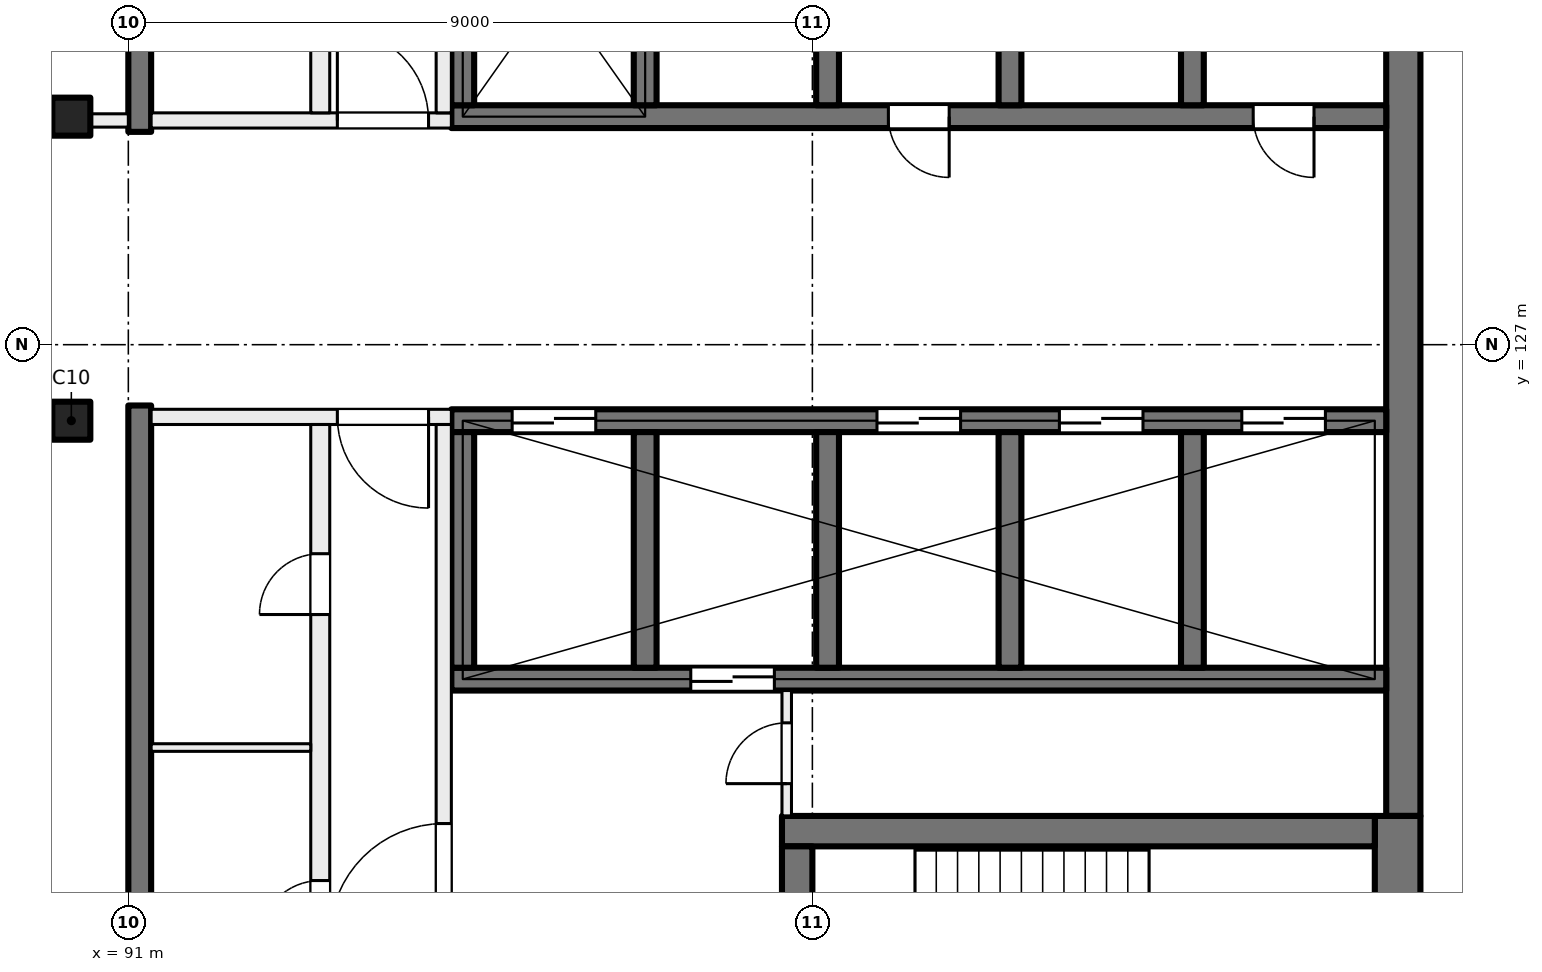
"""IFC4 building model, lengths in metres.
Left out: names, types, materials, properties, quantities, classifications, styles, units other than length and angle.
Written with IfcOpenShell. Run it as: python <this file> out.ifc"""

import sys

from ifc_helpers import new_model, si_unit, direction, frame, frame_2d, origin, origin_2d, place, context, subcontext, project, spatial, rectangle, extrude, element, fill, save


model = new_model("IFC4")
c1 = context("Model", 3, precision=1e-05, world=origin(), true_north=direction((0.0, 1.0)))
c2 = subcontext(c1, "Body", "Model", "MODEL_VIEW")
j1 = project(units=[si_unit("LENGTHUNIT", "METRE"), si_unit("PLANEANGLEUNIT", "RADIAN")], contexts=[c1])
p1 = place(None, origin())
s1 = spatial("IfcSite", under=j1, at=p1, CompositionType="ELEMENT")
p2 = place(p1, origin())
s2 = spatial("IfcBuilding", under=s1, at=p2, CompositionType="ELEMENT")
p3 = place(p2, frame((0.0, 0.0, 257.5)))
s3 = spatial("IfcBuildingStorey", under=s2, at=p3, CompositionType="ELEMENT", Elevation=257.5)
for number, where, z_axis, x_axis in (
    (1, (90.25, 130.0, 0.0), (0.0, 0.0, 1.0), (1.0, 0.0, 0.0)),
    (2, (90.25, 126.0, 0.0), (0.0, 0.0, 1.0), (1.0, 0.0, 0.0)),
):
    element("IfcColumn", number, at=place(p3, frame(where, z_axis=z_axis, x_axis=x_axis)), inside=s3, PredefinedType="COLUMN", context=c2, shape_type="SweptSolid", body=[
        extrude(rectangle(XDim=0.5, YDim=0.5, at=origin_2d()), origin(), (0.0, 0.0, 1.0), 4.0),
    ])
p4 = place(p3, frame((107.775, 135.2, 0.0), z_axis=(0.0, 0.0, 1.0), x_axis=(0.0, -1.0, 0.0)))
e3 = element("IfcWall", 3, at=p4, inside=s3, PredefinedType="SHEAR", context=c2, shape_type="SweptSolid", body=[
    extrude(rectangle(XDim=14.4, YDim=0.45, at=frame_2d((7.2, 0.0))), origin(), (0.0, 0.0, 1.0), 4.0),
])
p5 = place(p3, frame((107.7, 120.8, 0.0), z_axis=(0.0, 0.0, 1.0), x_axis=(0.0, -1.0, 0.0)))
e4 = element("IfcWall", 4, at=p5, inside=s3, PredefinedType="SHEAR", context=c2, shape_type="SweptSolid", body=[
    extrude(rectangle(XDim=3.8, YDim=0.6, at=frame_2d((1.9, 0.0))), origin(), (0.0, 0.0, 1.0), 4.0),
])
p6 = place(p3, frame((107.4, 120.6, 0.0), z_axis=(0.0, 0.0, 1.0), x_axis=(-1.0, 0.0, 0.0)))
e5 = element("IfcWall", 5, at=p6, inside=s3, PredefinedType="SHEAR", context=c2, shape_type="SweptSolid", body=[
    extrude(rectangle(XDim=7.8, YDim=0.4, at=frame_2d((3.9, 0.0))), origin(), (0.0, 0.0, 1.0), 4.0),
])
p7 = place(p3, frame((99.8, 120.4, 0.0), z_axis=(0.0, 0.0, 1.0), x_axis=(0.0, -1.0, 0.0)))
e6 = element("IfcWall", 6, at=p7, inside=s3, PredefinedType="SHEAR", context=c2, shape_type="SweptSolid", body=[
    extrude(rectangle(XDim=2.8, YDim=0.4, at=frame_2d((1.4, 0.0))), origin(), (0.0, 0.0, 1.0), 4.0),
])
p8 = place(p7, frame((0.975, 0.0, 0.0)))
e7 = element("IfcOpeningElement", 7, at=p8, cuts=e6, PredefinedType="OPENING", context=c2, shape_type="SweptSolid", body=[
    extrude(rectangle(XDim=1.0, YDim=2.1, at=frame_2d((0.5, 1.05))), frame((0.0, 0.21, 0.0), z_axis=(0.0, -1.0, 0.0), x_axis=(1.0, 0.0, 0.0)), (0.0, 0.0, 1.0), 0.42),
])
p9 = place(p3, frame((107.55, 130.0, 0.0), z_axis=(0.0, 0.0, 1.0), x_axis=(-1.0, 0.0, 0.0)))
e8 = element("IfcWall", 8, at=p9, inside=s3, PredefinedType="SHEAR", context=c2, shape_type="SweptSolid", body=[
    extrude(rectangle(XDim=12.3, YDim=0.3, at=frame_2d((6.15, 0.0))), origin(), (0.0, 0.0, 1.0), 4.0),
])
p10 = place(p9, frame((0.95, 0.0, 0.0)))
e9 = element("IfcOpeningElement", 9, at=p10, cuts=e8, PredefinedType="OPENING", context=c2, shape_type="SweptSolid", body=[
    extrude(rectangle(XDim=0.8, YDim=2.1, at=frame_2d((0.4, 1.05))), frame((0.0, 0.16, 0.0), z_axis=(0.0, -1.0, 0.0), x_axis=(1.0, 0.0, 0.0)), (0.0, 0.0, 1.0), 0.32),
])
p11 = place(p9, frame((5.75, 0.0, 0.0)))
e10 = element("IfcOpeningElement", 10, at=p11, cuts=e8, PredefinedType="OPENING", context=c2, shape_type="SweptSolid", body=[
    extrude(rectangle(XDim=0.8, YDim=2.1, at=frame_2d((0.4, 1.05))), frame((0.0, 0.16, 0.0), z_axis=(0.0, -1.0, 0.0), x_axis=(1.0, 0.0, 0.0)), (0.0, 0.0, 1.0), 0.32),
])
for number, where, z_axis, x_axis in (
    (11, (105.0, 133.25, 0.0), (0.0, 0.0, 1.0), (0.0, -1.0, 0.0)),
    (12, (102.6, 133.25, 0.0), (0.0, 0.0, 1.0), (0.0, -1.0, 0.0)),
    (13, (100.2, 133.25, 0.0), (0.0, 0.0, 1.0), (0.0, -1.0, 0.0)),
    (14, (97.8, 133.25, 0.0), (0.0, 0.0, 1.0), (0.0, -1.0, 0.0)),
    (15, (95.4, 133.25, 0.0), (0.0, 0.0, 1.0), (0.0, -1.0, 0.0)),
):
    element("IfcWall", number, at=place(p3, frame(where, z_axis=z_axis, x_axis=x_axis)), inside=s3, PredefinedType="SHEAR", context=c2, shape_type="SweptSolid", body=[
        extrude(rectangle(XDim=3.1, YDim=0.3, at=frame_2d((1.55, 0.0))), origin(), (0.0, 0.0, 1.0), 4.0),
    ])
p12 = place(p3, frame((107.55, 126.0, 0.0), z_axis=(0.0, 0.0, 1.0), x_axis=(-1.0, 0.0, 0.0)))
e16 = element("IfcWall", 16, at=p12, inside=s3, PredefinedType="SHEAR", context=c2, shape_type="SweptSolid", body=[
    extrude(rectangle(XDim=12.3, YDim=0.3, at=frame_2d((6.15, 0.0))), origin(), (0.0, 0.0, 1.0), 4.0),
])
p13 = place(p12, frame((0.8, 0.0, 0.0)))
e17 = element("IfcOpeningElement", 17, at=p13, cuts=e16, PredefinedType="OPENING", context=c2, shape_type="SweptSolid", body=[
    extrude(rectangle(XDim=1.1, YDim=2.1, at=frame_2d((0.55, 1.05))), frame((0.0, 0.16, 0.0), z_axis=(0.0, -1.0, 0.0), x_axis=(1.0, 0.0, 0.0)), (0.0, 0.0, 1.0), 0.32),
])
p14 = place(p12, frame((3.2, 0.0, 0.0)))
e18 = element("IfcOpeningElement", 18, at=p14, cuts=e16, PredefinedType="OPENING", context=c2, shape_type="SweptSolid", body=[
    extrude(rectangle(XDim=1.1, YDim=2.1, at=frame_2d((0.55, 1.05))), frame((0.0, 0.16, 0.0), z_axis=(0.0, -1.0, 0.0), x_axis=(1.0, 0.0, 0.0)), (0.0, 0.0, 1.0), 0.32),
])
p15 = place(p12, frame((5.6, 0.0, 0.0)))
e19 = element("IfcOpeningElement", 19, at=p15, cuts=e16, PredefinedType="OPENING", context=c2, shape_type="SweptSolid", body=[
    extrude(rectangle(XDim=1.1, YDim=2.1, at=frame_2d((0.55, 1.05))), frame((0.0, 0.16, 0.0), z_axis=(0.0, -1.0, 0.0), x_axis=(1.0, 0.0, 0.0)), (0.0, 0.0, 1.0), 0.32),
])
p16 = place(p12, frame((10.4, 0.0, 0.0)))
e20 = element("IfcOpeningElement", 20, at=p16, cuts=e16, PredefinedType="OPENING", context=c2, shape_type="SweptSolid", body=[
    extrude(rectangle(XDim=1.1, YDim=2.1, at=frame_2d((0.55, 1.05))), frame((0.0, 0.16, 0.0), z_axis=(0.0, -1.0, 0.0), x_axis=(1.0, 0.0, 0.0)), (0.0, 0.0, 1.0), 0.32),
])
p17 = place(p3, frame((107.55, 122.6, 0.0), z_axis=(0.0, 0.0, 1.0), x_axis=(-1.0, 0.0, 0.0)))
e21 = element("IfcWall", 21, at=p17, inside=s3, PredefinedType="SHEAR", context=c2, shape_type="SweptSolid", body=[
    extrude(rectangle(XDim=12.3, YDim=0.3, at=frame_2d((6.15, 0.0))), origin(), (0.0, 0.0, 1.0), 4.0),
])
p18 = place(p17, frame((8.05, 0.0, 0.0)))
e22 = element("IfcOpeningElement", 22, at=p18, cuts=e21, PredefinedType="OPENING", context=c2, shape_type="SweptSolid", body=[
    extrude(rectangle(XDim=1.1, YDim=2.1, at=frame_2d((0.55, 1.05))), frame((0.0, 0.16, 0.0), z_axis=(0.0, -1.0, 0.0), x_axis=(1.0, 0.0, 0.0)), (0.0, 0.0, 1.0), 0.32),
])
for number, where, z_axis, x_axis in (
    (23, (105.0, 125.85, 0.0), (0.0, 0.0, 1.0), (0.0, -1.0, 0.0)),
    (24, (102.6, 125.85, 0.0), (0.0, 0.0, 1.0), (0.0, -1.0, 0.0)),
    (25, (100.2, 125.85, 0.0), (0.0, 0.0, 1.0), (0.0, -1.0, 0.0)),
    (26, (97.8, 125.85, 0.0), (0.0, 0.0, 1.0), (0.0, -1.0, 0.0)),
    (27, (95.4, 125.85, 0.0), (0.0, 0.0, 1.0), (0.0, -1.0, 0.0)),
):
    element("IfcWall", number, at=place(p3, frame(where, z_axis=z_axis, x_axis=x_axis)), inside=s3, PredefinedType="SHEAR", context=c2, shape_type="SweptSolid", body=[
        extrude(rectangle(XDim=3.1, YDim=0.3, at=frame_2d((1.55, 0.0))), origin(), (0.0, 0.0, 1.0), 4.0),
    ])
for number, where, z_axis, x_axis in (
    (28, (91.15, 138.55, 0.0), (0.0, 0.0, 1.0), (0.0, -1.0, 0.0)),
    (29, (91.15, 126.2, 0.0), (0.0, 0.0, 1.0), (0.0, -1.0, 0.0)),
):
    element("IfcWall", number, at=place(p3, frame(where, z_axis=z_axis, x_axis=x_axis)), inside=s3, PredefinedType="SHEAR", context=c2, shape_type="SweptSolid", body=[
        extrude(rectangle(XDim=8.75, YDim=0.3, at=frame_2d((4.375, 0.0))), origin(), (0.0, 0.0, 1.0), 4.0),
    ])
p19 = place(p3, frame((95.25, 126.05, 0.0), z_axis=(0.0, 0.0, 1.0), x_axis=(-1.0, 0.0, 0.0)))
e30 = element("IfcWall", 30, at=p19, inside=s3, PredefinedType="PARTITIONING", context=c2, shape_type="SweptSolid", body=[
    extrude(rectangle(XDim=3.95, YDim=0.2, at=frame_2d((1.975, 0.0))), origin(), (0.0, 0.0, 1.0), 3.625),
])
p20 = place(p19, frame((0.3, 0.0, 0.0)))
e31 = element("IfcOpeningElement", 31, at=p20, cuts=e30, PredefinedType="OPENING", context=c2, shape_type="SweptSolid", body=[
    extrude(rectangle(XDim=1.2, YDim=2.1, at=frame_2d((0.6, 1.05))), frame((0.0, 0.11, 0.0), z_axis=(0.0, -1.0, 0.0), x_axis=(1.0, 0.0, 0.0)), (0.0, 0.0, 1.0), 0.22),
])
p21 = place(p3, frame((95.15, 117.45, 0.0), z_axis=(0.0, 0.0, 1.0), x_axis=(0.0, 1.0, 0.0)))
e32 = element("IfcWall", 32, at=p21, inside=s3, PredefinedType="PARTITIONING", context=c2, shape_type="SweptSolid", body=[
    extrude(rectangle(XDim=8.5, YDim=0.2, at=frame_2d((4.25, 0.0))), origin(), (0.0, 0.0, 1.0), 3.625),
])
p22 = place(p21, frame((1.75, 0.0, 0.0)))
e33 = element("IfcOpeningElement", 33, at=p22, cuts=e32, PredefinedType="OPENING", context=c2, shape_type="SweptSolid", body=[
    extrude(rectangle(XDim=1.5, YDim=2.1, at=frame_2d((0.75, 1.05))), frame((0.0, 0.11, 0.0), z_axis=(0.0, -1.0, 0.0), x_axis=(1.0, 0.0, 0.0)), (0.0, 0.0, 1.0), 0.22),
])
p23 = place(p3, frame((93.525, 117.45, 0.0), z_axis=(0.0, 0.0, 1.0), x_axis=(0.0, 1.0, 0.0)))
e34 = element("IfcWall", 34, at=p23, inside=s3, PredefinedType="PARTITIONING", context=c2, shape_type="SweptSolid", body=[
    extrude(rectangle(XDim=8.5, YDim=0.25, at=frame_2d((4.25, 0.0))), origin(), (0.0, 0.0, 1.0), 3.625),
])
p24 = place(p23, frame((6.0, 0.0, 0.0)))
e35 = element("IfcOpeningElement", 35, at=p24, cuts=e34, PredefinedType="OPENING", context=c2, shape_type="SweptSolid", body=[
    extrude(rectangle(XDim=0.8, YDim=2.1, at=frame_2d((0.4, 1.05))), frame((0.0, 0.135, 0.0), z_axis=(0.0, -1.0, 0.0), x_axis=(1.0, 0.0, 0.0)), (0.0, 0.0, 1.0), 0.27),
])
p25 = place(p23, frame((1.7, 0.0, 0.0)))
e36 = element("IfcOpeningElement", 36, at=p25, cuts=e34, PredefinedType="OPENING", context=c2, shape_type="SweptSolid", body=[
    extrude(rectangle(XDim=0.8, YDim=2.1, at=frame_2d((0.4, 1.05))), frame((0.0, 0.135, 0.0), z_axis=(0.0, -1.0, 0.0), x_axis=(1.0, 0.0, 0.0)), (0.0, 0.0, 1.0), 0.27),
])
p26 = place(p3, frame((99.663, 120.8, 0.0), z_axis=(0.0, 0.0, 1.0), x_axis=(0.0, 1.0, 0.0)))
e37 = element("IfcWall", 37, at=p26, inside=s3, PredefinedType="PARTITIONING", context=c2, shape_type="SweptSolid", body=[
    extrude(rectangle(XDim=1.65, YDim=0.125, at=frame_2d((0.825, 0.0))), origin(), (0.0, 0.0, 1.0), 3.625),
])
p27 = place(p26, frame((0.425, 0.0, 0.0)))
e38 = element("IfcOpeningElement", 38, at=p27, cuts=e37, PredefinedType="OPENING", context=c2, shape_type="SweptSolid", body=[
    extrude(rectangle(XDim=0.8, YDim=2.1, at=frame_2d((0.4, 1.05))), frame((0.0, 0.073, 0.0), z_axis=(0.0, -1.0, 0.0), x_axis=(1.0, 0.0, 0.0)), (0.0, 0.0, 1.0), 0.145),
])
p28 = place(p3, frame((93.4, 121.7, 0.0), z_axis=(0.0, 0.0, 1.0), x_axis=(-1.0, 0.0, 0.0)))
e39 = element("IfcWall", 39, at=p28, inside=s3, PredefinedType="PARTITIONING", context=c2, shape_type="SweptSolid", body=[
    extrude(rectangle(XDim=2.1, YDim=0.1, at=frame_2d((1.05, 0.0))), origin(), (0.0, 0.0, 1.0), 3.625),
])
p29 = place(p3, frame((91.3, 129.95, 0.0), z_axis=(0.0, 0.0, 1.0), x_axis=(1.0, 0.0, 0.0)))
e40 = element("IfcWall", 40, at=p29, inside=s3, PredefinedType="PARTITIONING", context=c2, shape_type="SweptSolid", body=[
    extrude(rectangle(XDim=3.95, YDim=0.2, at=frame_2d((1.975, 0.0))), origin(), (0.0, 0.0, 1.0), 3.625),
])
p30 = place(p29, frame((2.45, 0.0, 0.0)))
e41 = element("IfcOpeningElement", 41, at=p30, cuts=e40, PredefinedType="OPENING", context=c2, shape_type="SweptSolid", body=[
    extrude(rectangle(XDim=1.2, YDim=2.1, at=frame_2d((0.6, 1.05))), frame((0.0, 0.11, 0.0), z_axis=(0.0, -1.0, 0.0), x_axis=(1.0, 0.0, 0.0)), (0.0, 0.0, 1.0), 0.22),
])
p31 = place(p3, frame((95.15, 130.05, 0.0), z_axis=(0.0, 0.0, 1.0), x_axis=(0.0, 1.0, 0.0)))
e42 = element("IfcWall", 42, at=p31, inside=s3, PredefinedType="PARTITIONING", context=c2, shape_type="SweptSolid", body=[
    extrude(rectangle(XDim=8.5, YDim=0.2, at=frame_2d((4.25, 0.0))), origin(), (0.0, 0.0, 1.0), 3.625),
])
p32 = place(p31, frame((5.25, 0.0, 0.0)))
e43 = element("IfcOpeningElement", 43, at=p32, cuts=e42, PredefinedType="OPENING", context=c2, shape_type="SweptSolid", body=[
    extrude(rectangle(XDim=1.5, YDim=2.1, at=frame_2d((0.75, 1.05))), frame((0.0, 0.11, 0.0), z_axis=(0.0, -1.0, 0.0), x_axis=(1.0, 0.0, 0.0)), (0.0, 0.0, 1.0), 0.22),
])
p33 = place(p3, frame((93.525, 130.05, 0.0), z_axis=(0.0, 0.0, 1.0), x_axis=(0.0, 1.0, 0.0)))
e44 = element("IfcWall", 44, at=p33, inside=s3, PredefinedType="PARTITIONING", context=c2, shape_type="SweptSolid", body=[
    extrude(rectangle(XDim=8.5, YDim=0.25, at=frame_2d((4.25, 0.0))), origin(), (0.0, 0.0, 1.0), 3.625),
])
p34 = place(p33, frame((3.85, 0.0, 0.0)))
e45 = element("IfcOpeningElement", 45, at=p34, cuts=e44, PredefinedType="OPENING", context=c2, shape_type="SweptSolid", body=[
    extrude(rectangle(XDim=0.8, YDim=2.1, at=frame_2d((0.4, 1.05))), frame((0.0, 0.135, 0.0), z_axis=(0.0, -1.0, 0.0), x_axis=(1.0, 0.0, 0.0)), (0.0, 0.0, 1.0), 0.27),
])
p35 = place(p3, frame((85.838, 129.95, 0.0), z_axis=(0.0, 0.0, 1.0), x_axis=(1.0, 0.0, 0.0)))
e46 = element("IfcWall", 46, at=p35, inside=s3, PredefinedType="PARTITIONING", context=c2, shape_type="SweptSolid", body=[
    extrude(rectangle(XDim=5.162, YDim=0.175, at=frame_2d((2.581, 0.0))), origin(), (0.0, 0.0, 1.0), 3.625),
])
p36 = place(p35, frame((1.971, 0.0, 0.0)))
e47 = element("IfcOpeningElement", 47, at=p36, cuts=e46, PredefinedType="OPENING", context=c2, shape_type="SweptSolid", body=[
    extrude(rectangle(XDim=1.2, YDim=2.1, at=frame_2d((0.6, 1.05))), frame((0.0, 0.097, 0.0), z_axis=(0.0, -1.0, 0.0), x_axis=(1.0, 0.0, 0.0)), (0.0, 0.0, 1.0), 0.195),
])
p37 = place(p13, origin())
e48 = element("IfcDoor", 48, at=p37, inside=s3, OperationType="DOUBLE_DOOR_SLIDING", PredefinedType="DOOR", context=c2, shape_type="SweptSolid", body=[
    extrude(rectangle(XDim=1.1, YDim=2.1, at=frame_2d((0.55, 1.05))), frame((0.0, 0.025, 0.0), z_axis=(0.0, -1.0, 0.0), x_axis=(1.0, 0.0, 0.0)), (0.0, 0.0, 1.0), 0.05),
])
fill(e17, e48)
p38 = place(p14, origin())
e49 = element("IfcDoor", 49, at=p38, inside=s3, OperationType="DOUBLE_DOOR_SLIDING", PredefinedType="DOOR", context=c2, shape_type="SweptSolid", body=[
    extrude(rectangle(XDim=1.1, YDim=2.1, at=frame_2d((0.55, 1.05))), frame((0.0, 0.025, 0.0), z_axis=(0.0, -1.0, 0.0), x_axis=(1.0, 0.0, 0.0)), (0.0, 0.0, 1.0), 0.05),
])
fill(e18, e49)
p39 = place(p15, origin())
e50 = element("IfcDoor", 50, at=p39, inside=s3, OperationType="DOUBLE_DOOR_SLIDING", PredefinedType="DOOR", context=c2, shape_type="SweptSolid", body=[
    extrude(rectangle(XDim=1.1, YDim=2.1, at=frame_2d((0.55, 1.05))), frame((0.0, 0.025, 0.0), z_axis=(0.0, -1.0, 0.0), x_axis=(1.0, 0.0, 0.0)), (0.0, 0.0, 1.0), 0.05),
])
fill(e19, e50)
p40 = place(p16, origin())
e51 = element("IfcDoor", 51, at=p40, inside=s3, OperationType="DOUBLE_DOOR_SLIDING", PredefinedType="DOOR", context=c2, shape_type="SweptSolid", body=[
    extrude(rectangle(XDim=1.1, YDim=2.1, at=frame_2d((0.55, 1.05))), frame((0.0, 0.025, 0.0), z_axis=(0.0, -1.0, 0.0), x_axis=(1.0, 0.0, 0.0)), (0.0, 0.0, 1.0), 0.05),
])
fill(e20, e51)
p41 = place(p10, origin())
e52 = element("IfcDoor", 52, at=p41, inside=s3, OperationType="SINGLE_SWING_LEFT", PredefinedType="DOOR", context=c2, shape_type="SweptSolid", body=[
    extrude(rectangle(XDim=0.8, YDim=2.1, at=frame_2d((0.4, 1.05))), frame((0.0, 0.025, 0.0), z_axis=(0.0, -1.0, 0.0), x_axis=(1.0, 0.0, 0.0)), (0.0, 0.0, 1.0), 0.05),
])
fill(e9, e52)
p42 = place(p11, origin())
e53 = element("IfcDoor", 53, at=p42, inside=s3, OperationType="SINGLE_SWING_RIGHT", PredefinedType="DOOR", context=c2, shape_type="SweptSolid", body=[
    extrude(rectangle(XDim=0.8, YDim=2.1, at=frame_2d((0.4, 1.05))), frame((0.0, 0.025, 0.0), z_axis=(0.0, -1.0, 0.0), x_axis=(1.0, 0.0, 0.0)), (0.0, 0.0, 1.0), 0.05),
])
fill(e10, e53)
p43 = place(p20, origin())
e54 = element("IfcDoor", 54, at=p43, inside=s3, OperationType="DOUBLE_DOOR_SINGLE_SWING", PredefinedType="DOOR", context=c2, shape_type="SweptSolid", body=[
    extrude(rectangle(XDim=1.2, YDim=2.1, at=frame_2d((0.6, 1.05))), frame((0.0, 0.025, 0.0), z_axis=(0.0, -1.0, 0.0), x_axis=(1.0, 0.0, 0.0)), (0.0, 0.0, 1.0), 0.05),
])
fill(e31, e54)
p44 = place(p22, origin())
e55 = element("IfcDoor", 55, at=p44, inside=s3, OperationType="DOUBLE_DOOR_SINGLE_SWING", PredefinedType="DOOR", context=c2, shape_type="SweptSolid", body=[
    extrude(rectangle(XDim=1.5, YDim=2.1, at=frame_2d((0.75, 1.05))), frame((0.0, 0.025, 0.0), z_axis=(0.0, -1.0, 0.0), x_axis=(1.0, 0.0, 0.0)), (0.0, 0.0, 1.0), 0.05),
])
fill(e33, e55)
p45 = place(p27, origin())
e56 = element("IfcDoor", 56, at=p45, inside=s3, OperationType="SINGLE_SWING_RIGHT", PredefinedType="DOOR", context=c2, shape_type="SweptSolid", body=[
    extrude(rectangle(XDim=0.8, YDim=2.1, at=frame_2d((0.4, 1.05))), frame((0.0, 0.025, 0.0), z_axis=(0.0, -1.0, 0.0), x_axis=(1.0, 0.0, 0.0)), (0.0, 0.0, 1.0), 0.05),
])
fill(e38, e56)
p46 = place(p24, origin())
e57 = element("IfcDoor", 57, at=p46, inside=s3, OperationType="SINGLE_SWING_LEFT", PredefinedType="DOOR", context=c2, shape_type="SweptSolid", body=[
    extrude(rectangle(XDim=0.8, YDim=2.1, at=frame_2d((0.4, 1.05))), frame((0.0, 0.025, 0.0), z_axis=(0.0, -1.0, 0.0), x_axis=(1.0, 0.0, 0.0)), (0.0, 0.0, 1.0), 0.05),
])
fill(e35, e57)
p47 = place(p25, origin())
e58 = element("IfcDoor", 58, at=p47, inside=s3, OperationType="SINGLE_SWING_RIGHT", PredefinedType="DOOR", context=c2, shape_type="SweptSolid", body=[
    extrude(rectangle(XDim=0.8, YDim=2.1, at=frame_2d((0.4, 1.05))), frame((0.0, 0.025, 0.0), z_axis=(0.0, -1.0, 0.0), x_axis=(1.0, 0.0, 0.0)), (0.0, 0.0, 1.0), 0.05),
])
fill(e36, e58)
p48 = place(p30, origin())
e59 = element("IfcDoor", 59, at=p48, inside=s3, OperationType="DOUBLE_DOOR_SINGLE_SWING", PredefinedType="DOOR", context=c2, shape_type="SweptSolid", body=[
    extrude(rectangle(XDim=1.2, YDim=2.1, at=frame_2d((0.6, 1.05))), frame((0.0, 0.025, 0.0), z_axis=(0.0, -1.0, 0.0), x_axis=(1.0, 0.0, 0.0)), (0.0, 0.0, 1.0), 0.05),
])
fill(e41, e59)
p49 = place(p18, origin())
e60 = element("IfcDoor", 60, at=p49, inside=s3, OperationType="DOUBLE_DOOR_SLIDING", PredefinedType="DOOR", context=c2, shape_type="SweptSolid", body=[
    extrude(rectangle(XDim=1.1, YDim=2.1, at=frame_2d((0.55, 1.05))), frame((0.0, 0.025, 0.0), z_axis=(0.0, -1.0, 0.0), x_axis=(1.0, 0.0, 0.0)), (0.0, 0.0, 1.0), 0.05),
])
fill(e22, e60)
save(model, sys.argv[1])
